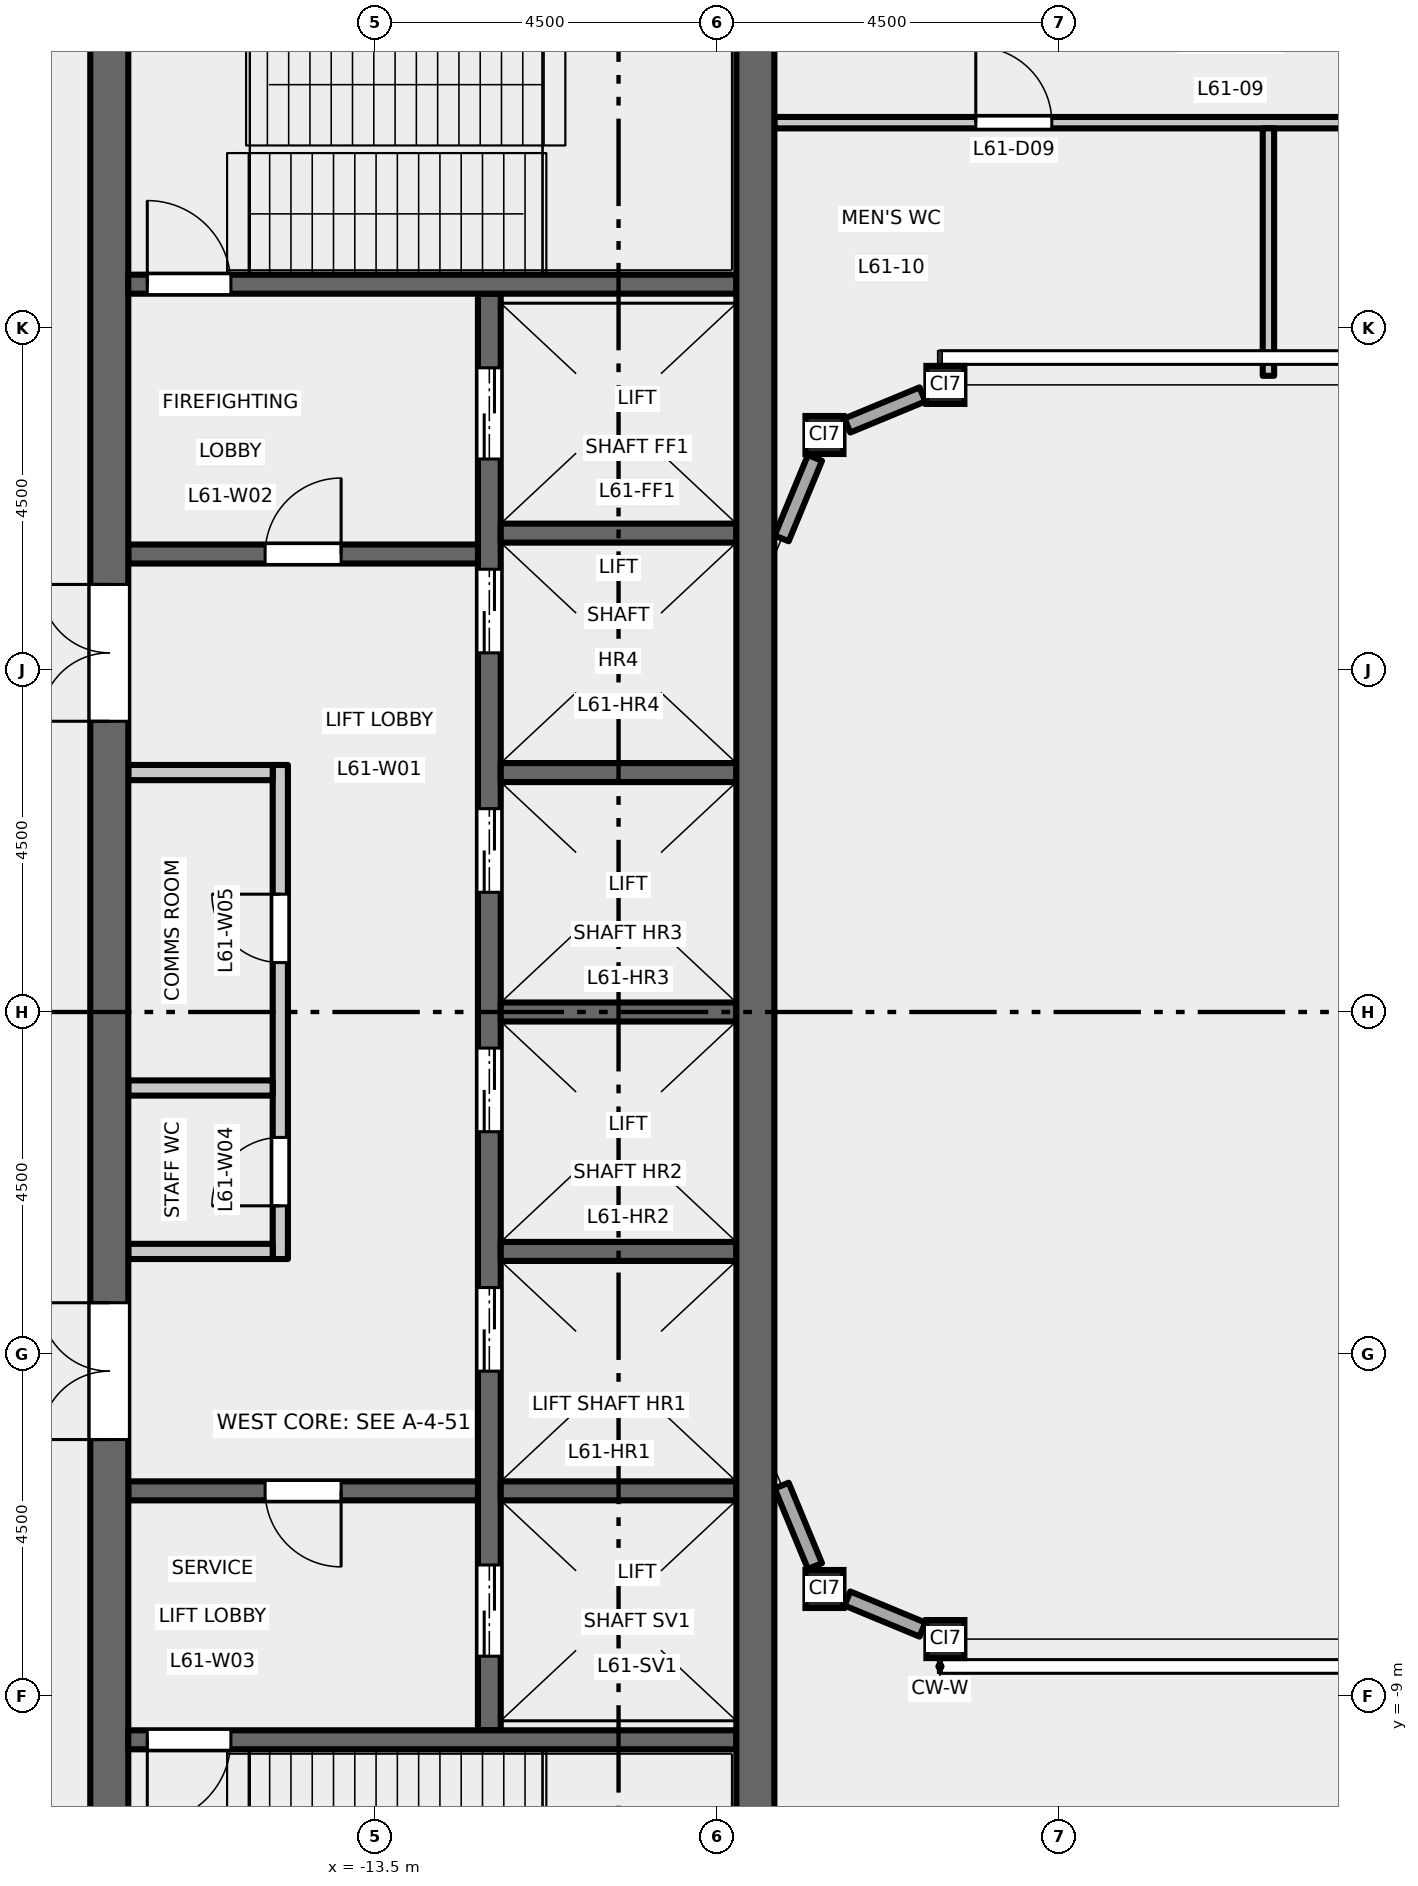
"""IFC4 building model, lengths in metres.
Left out: names, types, materials, properties, quantities, classifications, styles, units other than length and angle.
Written with IfcOpenShell. Run it as: python <this file> out.ifc"""

import sys

from ifc_helpers import new_model, si_unit, direction, frame, frame_2d, origin, origin_2d, place, context, subcontext, project, spatial, rectangle, hollow_rectangle, extrude, element, fill, save


model = new_model("IFC4")
c1 = context("Model", 3, precision=1e-05, world=origin(), true_north=direction((0.0, 1.0)))
c2 = subcontext(c1, "Body", "Model", "MODEL_VIEW")
j1 = project(units=[si_unit("LENGTHUNIT", "METRE"), si_unit("PLANEANGLEUNIT", "RADIAN")], contexts=[c1])
p1 = place(None, origin())
s1 = spatial("IfcSite", under=j1, at=p1, CompositionType="ELEMENT")
p2 = place(p1, origin())
s2 = spatial("IfcBuilding", under=s1, at=p2, CompositionType="ELEMENT")
p3 = place(p2, frame((0.0, 0.0, 284.2)))
s3 = spatial("IfcBuildingStorey", under=s2, at=p3, CompositionType="ELEMENT", Elevation=284.2)
for number, where, z_axis, x_axis in (
    (1, (-7.591, -7.591, 0.0), (0.0, 0.0, 1.0), (1.0, 0.0, 0.0)),
    (2, (-6.0, -8.25, 0.0), (0.0, 0.0, 1.0), (1.0, 0.0, 0.0)),
    (3, (-7.591, 7.591, 0.0), (0.0, 0.0, 1.0), (1.0, 0.0, 0.0)),
    (4, (-6.0, 8.25, 0.0), (0.0, 0.0, 1.0), (1.0, 0.0, 0.0)),
):
    element("IfcColumn", number, at=place(p3, frame(where, z_axis=z_axis, x_axis=x_axis)), inside=s3, PredefinedType="COLUMN", context=c2, shape_type="SweptSolid", body=[
        extrude(hollow_rectangle(XDim=0.5, YDim=0.5, WallThickness=0.025, at=origin_2d()), origin(), (0.0, 0.0, 1.0), 5.5),
    ])
p4 = place(p3, frame((-14.75, -3.25, 0.0), z_axis=(0.0, 0.0, 1.0), x_axis=(0.0, 1.0, 0.0)))
e5 = element("IfcWall", 5, at=p4, inside=s3, PredefinedType="PARTITIONING", context=c2, shape_type="SweptSolid", body=[
    extrude(rectangle(XDim=6.5, YDim=0.2, at=frame_2d((3.25, 0.0))), origin(), (0.0, 0.0, 1.0), 5.35),
])
p5 = place(p4, frame((0.7, 0.0, 0.0)))
e6 = element("IfcOpeningElement", 6, at=p5, cuts=e5, PredefinedType="OPENING", context=c2, shape_type="SweptSolid", body=[
    extrude(rectangle(XDim=0.9, YDim=2.1, at=frame_2d((0.45, 1.05))), frame((0.0, 0.11, 0.0), z_axis=(0.0, -1.0, 0.0), x_axis=(1.0, 0.0, 0.0)), (0.0, 0.0, 1.0), 0.22),
])
p6 = place(p4, frame((3.9, 0.0, 0.0)))
e7 = element("IfcOpeningElement", 7, at=p6, cuts=e5, PredefinedType="OPENING", context=c2, shape_type="SweptSolid", body=[
    extrude(rectangle(XDim=0.9, YDim=2.1, at=frame_2d((0.45, 1.05))), frame((0.0, 0.11, 0.0), z_axis=(0.0, -1.0, 0.0), x_axis=(1.0, 0.0, 0.0)), (0.0, 0.0, 1.0), 0.22),
])
for number, where, z_axis, x_axis in (
    (8, (-14.85, 3.15, 0.0), (0.0, 0.0, 1.0), (-1.0, 0.0, 0.0)),
    (9, (-14.85, -3.15, 0.0), (0.0, 0.0, 1.0), (-1.0, 0.0, 0.0)),
    (10, (-14.85, -1.0, 0.0), (0.0, 0.0, 1.0), (-1.0, 0.0, 0.0)),
):
    element("IfcWall", number, at=place(p3, frame(where, z_axis=z_axis, x_axis=x_axis)), inside=s3, PredefinedType="PARTITIONING", context=c2, shape_type="SweptSolid", body=[
        extrude(rectangle(XDim=1.9, YDim=0.2, at=frame_2d((0.95, 0.0))), origin(), (0.0, 0.0, 1.0), 5.35),
    ])
p7 = place(p3, frame((-12.0, -9.45, 0.0), z_axis=(0.0, 0.0, 1.0), x_axis=(0.0, 1.0, 0.0)))
e11 = element("IfcWall", 11, at=p7, inside=s3, PredefinedType="SHEAR", context=c2, shape_type="SweptSolid", body=[
    extrude(rectangle(XDim=18.9, YDim=0.3, at=frame_2d((9.45, 0.0))), origin(), (0.0, 0.0, 1.0), 5.35),
])
p8 = place(p7, frame((4.725, 0.0, 0.0)))
e12 = element("IfcOpeningElement", 12, at=p8, cuts=e11, PredefinedType="OPENING", context=c2, shape_type="SweptSolid", body=[
    extrude(rectangle(XDim=1.1, YDim=2.1, at=frame_2d((0.55, 1.05))), frame((0.0, 0.16, 0.0), z_axis=(0.0, -1.0, 0.0), x_axis=(1.0, 0.0, 0.0)), (0.0, 0.0, 1.0), 0.32),
])
p9 = place(p7, frame((7.875, 0.0, 0.0)))
e13 = element("IfcOpeningElement", 13, at=p9, cuts=e11, PredefinedType="OPENING", context=c2, shape_type="SweptSolid", body=[
    extrude(rectangle(XDim=1.1, YDim=2.1, at=frame_2d((0.55, 1.05))), frame((0.0, 0.16, 0.0), z_axis=(0.0, -1.0, 0.0), x_axis=(1.0, 0.0, 0.0)), (0.0, 0.0, 1.0), 0.32),
])
p10 = place(p7, frame((11.025, 0.0, 0.0)))
e14 = element("IfcOpeningElement", 14, at=p10, cuts=e11, PredefinedType="OPENING", context=c2, shape_type="SweptSolid", body=[
    extrude(rectangle(XDim=1.1, YDim=2.1, at=frame_2d((0.55, 1.05))), frame((0.0, 0.16, 0.0), z_axis=(0.0, -1.0, 0.0), x_axis=(1.0, 0.0, 0.0)), (0.0, 0.0, 1.0), 0.32),
])
p11 = place(p7, frame((14.175, 0.0, 0.0)))
e15 = element("IfcOpeningElement", 15, at=p11, cuts=e11, PredefinedType="OPENING", context=c2, shape_type="SweptSolid", body=[
    extrude(rectangle(XDim=1.1, YDim=2.1, at=frame_2d((0.55, 1.05))), frame((0.0, 0.16, 0.0), z_axis=(0.0, -1.0, 0.0), x_axis=(1.0, 0.0, 0.0)), (0.0, 0.0, 1.0), 0.32),
])
p12 = place(p7, frame((16.725, 0.0, 0.0)))
e16 = element("IfcOpeningElement", 16, at=p12, cuts=e11, PredefinedType="OPENING", context=c2, shape_type="SweptSolid", body=[
    extrude(rectangle(XDim=1.2, YDim=2.1, at=frame_2d((0.6, 1.05))), frame((0.0, 0.16, 0.0), z_axis=(0.0, -1.0, 0.0), x_axis=(1.0, 0.0, 0.0)), (0.0, 0.0, 1.0), 0.32),
])
p13 = place(p7, frame((0.975, 0.0, 0.0)))
e17 = element("IfcOpeningElement", 17, at=p13, cuts=e11, PredefinedType="OPENING", context=c2, shape_type="SweptSolid", body=[
    extrude(rectangle(XDim=1.2, YDim=2.1, at=frame_2d((0.6, 1.05))), frame((0.0, 0.16, 0.0), z_axis=(0.0, -1.0, 0.0), x_axis=(1.0, 0.0, 0.0)), (0.0, 0.0, 1.0), 0.32),
])
p14 = place(p3, frame((-12.15, 6.025, 0.0), z_axis=(0.0, 0.0, 1.0), x_axis=(-1.0, 0.0, 0.0)))
e18 = element("IfcWall", 18, at=p14, inside=s3, PredefinedType="SHEAR", context=c2, shape_type="SweptSolid", body=[
    extrude(rectangle(XDim=4.6, YDim=0.25, at=frame_2d((2.3, 0.0))), origin(), (0.0, 0.0, 1.0), 5.35),
])
p15 = place(p14, frame((1.8, 0.0, 0.0)))
e19 = element("IfcOpeningElement", 19, at=p15, cuts=e18, PredefinedType="OPENING", context=c2, shape_type="SweptSolid", body=[
    extrude(rectangle(XDim=1.0, YDim=2.1, at=frame_2d((0.5, 1.05))), frame((0.0, 0.135, 0.0), z_axis=(0.0, -1.0, 0.0), x_axis=(1.0, 0.0, 0.0)), (0.0, 0.0, 1.0), 0.27),
])
p16 = place(p3, frame((-12.15, -6.3, 0.0), z_axis=(0.0, 0.0, 1.0), x_axis=(-1.0, 0.0, 0.0)))
e20 = element("IfcWall", 20, at=p16, inside=s3, PredefinedType="SHEAR", context=c2, shape_type="SweptSolid", body=[
    extrude(rectangle(XDim=4.6, YDim=0.25, at=frame_2d((2.3, 0.0))), origin(), (0.0, 0.0, 1.0), 5.35),
])
p17 = place(p16, frame((1.8, 0.0, 0.0)))
e21 = element("IfcOpeningElement", 21, at=p17, cuts=e20, PredefinedType="OPENING", context=c2, shape_type="SweptSolid", body=[
    extrude(rectangle(XDim=1.0, YDim=2.1, at=frame_2d((0.5, 1.05))), frame((0.0, 0.135, 0.0), z_axis=(0.0, -1.0, 0.0), x_axis=(1.0, 0.0, 0.0)), (0.0, 0.0, 1.0), 0.27),
])
p18 = place(p3, frame((-17.0, -13.0, 0.0), z_axis=(0.0, 0.0, 1.0), x_axis=(0.0, 1.0, 0.0)))
e22 = element("IfcWall", 22, at=p18, inside=s3, PredefinedType="SHEAR", context=c2, shape_type="SweptSolid", body=[
    extrude(rectangle(XDim=26.0, YDim=0.5, at=frame_2d((13.0, 0.0))), origin(), (0.0, 0.0, 1.0), 5.35),
])
p19 = place(p18, frame((16.825, 0.0, 0.0)))
e23 = element("IfcOpeningElement", 23, at=p19, cuts=e22, PredefinedType="OPENING", context=c2, shape_type="SweptSolid", body=[
    extrude(rectangle(XDim=1.8, YDim=2.1, at=frame_2d((0.9, 1.05))), frame((0.0, 0.26, 0.0), z_axis=(0.0, -1.0, 0.0), x_axis=(1.0, 0.0, 0.0)), (0.0, 0.0, 1.0), 0.52),
])
p20 = place(p18, frame((7.375, 0.0, 0.0)))
e24 = element("IfcOpeningElement", 24, at=p20, cuts=e22, PredefinedType="OPENING", context=c2, shape_type="SweptSolid", body=[
    extrude(rectangle(XDim=1.8, YDim=2.1, at=frame_2d((0.9, 1.05))), frame((0.0, 0.26, 0.0), z_axis=(0.0, -1.0, 0.0), x_axis=(1.0, 0.0, 0.0)), (0.0, 0.0, 1.0), 0.52),
])
for number, where, z_axis, x_axis in (
    (25, (-8.75, 0.0, 0.0), (0.0, 0.0, 1.0), (-1.0, 0.0, 0.0)),
    (26, (-8.75, 3.15, 0.0), (0.0, 0.0, 1.0), (-1.0, 0.0, 0.0)),
    (27, (-8.75, 6.3, 0.0), (0.0, 0.0, 1.0), (-1.0, 0.0, 0.0)),
    (28, (-8.75, -3.15, 0.0), (0.0, 0.0, 1.0), (-1.0, 0.0, 0.0)),
    (29, (-8.75, -6.3, 0.0), (0.0, 0.0, 1.0), (-1.0, 0.0, 0.0)),
):
    element("IfcWall", number, at=place(p3, frame(where, z_axis=z_axis, x_axis=x_axis)), inside=s3, PredefinedType="SHEAR", context=c2, shape_type="SweptSolid", body=[
        extrude(rectangle(XDim=3.1, YDim=0.25, at=frame_2d((1.55, 0.0))), origin(), (0.0, 0.0, 1.0), 5.35),
    ])
p21 = place(p3, frame((-8.75, 9.575, 0.0), z_axis=(0.0, 0.0, 1.0), x_axis=(-1.0, 0.0, 0.0)))
e30 = element("IfcWall", 30, at=p21, inside=s3, PredefinedType="SHEAR", context=c2, shape_type="SweptSolid", body=[
    extrude(rectangle(XDim=8.0, YDim=0.25, at=frame_2d((4.0, 0.0))), origin(), (0.0, 0.0, 1.0), 5.35),
])
p22 = place(p21, frame((6.65, 0.0, 0.0)))
e31 = element("IfcOpeningElement", 31, at=p22, cuts=e30, PredefinedType="OPENING", context=c2, shape_type="SweptSolid", body=[
    extrude(rectangle(XDim=1.1, YDim=2.1, at=frame_2d((0.55, 1.05))), frame((0.0, 0.135, 0.0), z_axis=(0.0, -1.0, 0.0), x_axis=(1.0, 0.0, 0.0)), (0.0, 0.0, 1.0), 0.27),
])
p23 = place(p3, frame((-8.75, -9.575, 0.0), z_axis=(0.0, 0.0, 1.0), x_axis=(-1.0, 0.0, 0.0)))
e32 = element("IfcWall", 32, at=p23, inside=s3, PredefinedType="SHEAR", context=c2, shape_type="SweptSolid", body=[
    extrude(rectangle(XDim=8.0, YDim=0.25, at=frame_2d((4.0, 0.0))), origin(), (0.0, 0.0, 1.0), 5.35),
])
p24 = place(p23, frame((6.65, 0.0, 0.0)))
e33 = element("IfcOpeningElement", 33, at=p24, cuts=e32, PredefinedType="OPENING", context=c2, shape_type="SweptSolid", body=[
    extrude(rectangle(XDim=1.1, YDim=2.1, at=frame_2d((0.55, 1.05))), frame((0.0, 0.135, 0.0), z_axis=(0.0, -1.0, 0.0), x_axis=(1.0, 0.0, 0.0)), (0.0, 0.0, 1.0), 0.27),
])
p25 = place(p3, frame((-8.5, -13.0, 0.0), z_axis=(0.0, 0.0, 1.0), x_axis=(0.0, 1.0, 0.0)))
e34 = element("IfcWall", 34, at=p25, inside=s3, PredefinedType="SHEAR", context=c2, shape_type="SweptSolid", body=[
    extrude(rectangle(XDim=26.0, YDim=0.5, at=frame_2d((13.0, 0.0))), origin(), (0.0, 0.0, 1.0), 5.35),
])
p26 = place(p3, frame((-6.302, 8.125, 0.0), z_axis=(0.0, 0.0, 1.0), x_axis=(-0.923919409248, -0.382587147216, 0.0)))
e35 = element("IfcWall", 35, at=p26, inside=s3, PredefinedType="STANDARD", context=c2, shape_type="SweptSolid", body=[
    extrude(rectangle(XDim=1.069, YDim=0.2, at=frame_2d((0.534, 0.0))), origin(), (0.0, 0.0, 1.0), 5.01),
])
for number, where, z_axis, x_axis in (
    (36, (-7.716, 7.289, 0.0), (0.0, 0.0, 1.0), (-0.383, -0.924, 0.0)),
    (37, (-8.154, -6.231, 0.0), (0.0, 0.0, 1.0), (0.383, -0.924, 0.0)),
):
    element("IfcWall", number, at=place(p3, frame(where, z_axis=z_axis, x_axis=x_axis)), inside=s3, PredefinedType="STANDARD", context=c2, shape_type="SweptSolid", body=[
        extrude(rectangle(XDim=1.146, YDim=0.2, at=frame_2d((0.573, 0.0))), origin(), (0.0, 0.0, 1.0), 5.01),
    ])
p27 = place(p3, frame((-7.289, -7.716, 0.0), z_axis=(0.0, 0.0, 1.0), x_axis=(0.923919409248, -0.382587147216, 0.0)))
e38 = element("IfcWall", 38, at=p27, inside=s3, PredefinedType="STANDARD", context=c2, shape_type="SweptSolid", body=[
    extrude(rectangle(XDim=1.069, YDim=0.2, at=frame_2d((0.534, 0.0))), origin(), (0.0, 0.0, 1.0), 5.01),
])
p28 = place(p3, frame((-8.25, 11.7, 0.0), z_axis=(0.0, 0.0, 1.0), x_axis=(1.0, 0.0, 0.0)))
e39 = element("IfcWall", 39, at=p28, inside=s3, PredefinedType="PARTITIONING", context=c2, shape_type="SweptSolid", body=[
    extrude(rectangle(XDim=15.25, YDim=0.15, at=frame_2d((7.625, 0.0))), origin(), (0.0, 0.0, 1.0), 5.35),
])
p29 = place(p28, frame((2.65, 0.0, 0.0)))
e40 = element("IfcOpeningElement", 40, at=p29, cuts=e39, PredefinedType="OPENING", context=c2, shape_type="SweptSolid", body=[
    extrude(rectangle(XDim=1.0, YDim=2.1, at=frame_2d((0.5, 1.05))), frame((0.0, 0.085, 0.0), z_axis=(0.0, -1.0, 0.0), x_axis=(1.0, 0.0, 0.0)), (0.0, 0.0, 1.0), 0.17),
])
p30 = place(p28, frame((9.15, 0.0, 0.0)))
e41 = element("IfcOpeningElement", 41, at=p30, cuts=e39, PredefinedType="OPENING", context=c2, shape_type="SweptSolid", body=[
    extrude(rectangle(XDim=1.0, YDim=2.1, at=frame_2d((0.5, 1.05))), frame((0.0, 0.085, 0.0), z_axis=(0.0, -1.0, 0.0), x_axis=(1.0, 0.0, 0.0)), (0.0, 0.0, 1.0), 0.17),
])
p31 = place(p28, frame((13.65, 0.0, 0.0)))
e42 = element("IfcOpeningElement", 42, at=p31, cuts=e39, PredefinedType="OPENING", context=c2, shape_type="SweptSolid", body=[
    extrude(rectangle(XDim=1.0, YDim=2.1, at=frame_2d((0.5, 1.05))), frame((0.0, 0.085, 0.0), z_axis=(0.0, -1.0, 0.0), x_axis=(1.0, 0.0, 0.0)), (0.0, 0.0, 1.0), 0.17),
])
p32 = place(p3, frame((-1.75, 8.37, 0.0), z_axis=(0.0, 0.0, 1.0), x_axis=(0.0, 1.0, 0.0)))
e43 = element("IfcWall", 43, at=p32, inside=s3, PredefinedType="PARTITIONING", context=c2, shape_type="SweptSolid", body=[
    extrude(rectangle(XDim=3.255, YDim=0.15, at=frame_2d((1.627, 0.0))), origin(), (0.0, 0.0, 1.0), 5.35),
])
p33 = place(p15, origin())
e44 = element("IfcDoor", 44, at=p33, inside=s3, OperationType="SINGLE_SWING_LEFT", PredefinedType="DOOR", context=c2, shape_type="SweptSolid", body=[
    extrude(rectangle(XDim=1.0, YDim=2.1, at=frame_2d((0.5, 1.05))), frame((0.0, 0.025, 0.0), z_axis=(0.0, -1.0, 0.0), x_axis=(1.0, 0.0, 0.0)), (0.0, 0.0, 1.0), 0.05),
])
fill(e19, e44)
p34 = place(p17, origin())
e45 = element("IfcDoor", 45, at=p34, inside=s3, OperationType="SINGLE_SWING_RIGHT", PredefinedType="DOOR", context=c2, shape_type="SweptSolid", body=[
    extrude(rectangle(XDim=1.0, YDim=2.1, at=frame_2d((0.5, 1.05))), frame((0.0, 0.025, 0.0), z_axis=(0.0, -1.0, 0.0), x_axis=(1.0, 0.0, 0.0)), (0.0, 0.0, 1.0), 0.05),
])
fill(e21, e45)
p35 = place(p22, origin())
e46 = element("IfcDoor", 46, at=p35, inside=s3, OperationType="SINGLE_SWING_RIGHT", PredefinedType="DOOR", context=c2, shape_type="SweptSolid", body=[
    extrude(rectangle(XDim=1.1, YDim=2.1, at=frame_2d((0.55, 1.05))), frame((0.0, 0.025, 0.0), z_axis=(0.0, -1.0, 0.0), x_axis=(1.0, 0.0, 0.0)), (0.0, 0.0, 1.0), 0.05),
])
fill(e31, e46)
p36 = place(p24, origin())
e47 = element("IfcDoor", 47, at=p36, inside=s3, OperationType="SINGLE_SWING_LEFT", PredefinedType="DOOR", context=c2, shape_type="SweptSolid", body=[
    extrude(rectangle(XDim=1.1, YDim=2.1, at=frame_2d((0.55, 1.05))), frame((0.0, 0.025, 0.0), z_axis=(0.0, -1.0, 0.0), x_axis=(1.0, 0.0, 0.0)), (0.0, 0.0, 1.0), 0.05),
])
fill(e33, e47)
p37 = place(p19, origin())
e48 = element("IfcDoor", 48, at=p37, inside=s3, OperationType="DOUBLE_DOOR_DOUBLE_SWING", PredefinedType="DOOR", context=c2, shape_type="SweptSolid", body=[
    extrude(rectangle(XDim=1.8, YDim=2.1, at=frame_2d((0.9, 1.05))), frame((0.0, 0.025, 0.0), z_axis=(0.0, -1.0, 0.0), x_axis=(1.0, 0.0, 0.0)), (0.0, 0.0, 1.0), 0.05),
])
fill(e23, e48)
p38 = place(p20, origin())
e49 = element("IfcDoor", 49, at=p38, inside=s3, OperationType="DOUBLE_DOOR_DOUBLE_SWING", PredefinedType="DOOR", context=c2, shape_type="SweptSolid", body=[
    extrude(rectangle(XDim=1.8, YDim=2.1, at=frame_2d((0.9, 1.05))), frame((0.0, 0.025, 0.0), z_axis=(0.0, -1.0, 0.0), x_axis=(1.0, 0.0, 0.0)), (0.0, 0.0, 1.0), 0.05),
])
fill(e24, e49)
p39 = place(p8, origin())
e50 = element("IfcDoor", 50, at=p39, inside=s3, OperationType="DOUBLE_DOOR_SLIDING", PredefinedType="DOOR", context=c2, shape_type="SweptSolid", body=[
    extrude(rectangle(XDim=1.1, YDim=2.1, at=frame_2d((0.55, 1.05))), frame((0.0, 0.025, 0.0), z_axis=(0.0, -1.0, 0.0), x_axis=(1.0, 0.0, 0.0)), (0.0, 0.0, 1.0), 0.05),
])
fill(e12, e50)
p40 = place(p9, origin())
e51 = element("IfcDoor", 51, at=p40, inside=s3, OperationType="DOUBLE_DOOR_SLIDING", PredefinedType="DOOR", context=c2, shape_type="SweptSolid", body=[
    extrude(rectangle(XDim=1.1, YDim=2.1, at=frame_2d((0.55, 1.05))), frame((0.0, 0.025, 0.0), z_axis=(0.0, -1.0, 0.0), x_axis=(1.0, 0.0, 0.0)), (0.0, 0.0, 1.0), 0.05),
])
fill(e13, e51)
p41 = place(p10, origin())
e52 = element("IfcDoor", 52, at=p41, inside=s3, OperationType="DOUBLE_DOOR_SLIDING", PredefinedType="DOOR", context=c2, shape_type="SweptSolid", body=[
    extrude(rectangle(XDim=1.1, YDim=2.1, at=frame_2d((0.55, 1.05))), frame((0.0, 0.025, 0.0), z_axis=(0.0, -1.0, 0.0), x_axis=(1.0, 0.0, 0.0)), (0.0, 0.0, 1.0), 0.05),
])
fill(e14, e52)
p42 = place(p11, origin())
e53 = element("IfcDoor", 53, at=p42, inside=s3, OperationType="DOUBLE_DOOR_SLIDING", PredefinedType="DOOR", context=c2, shape_type="SweptSolid", body=[
    extrude(rectangle(XDim=1.1, YDim=2.1, at=frame_2d((0.55, 1.05))), frame((0.0, 0.025, 0.0), z_axis=(0.0, -1.0, 0.0), x_axis=(1.0, 0.0, 0.0)), (0.0, 0.0, 1.0), 0.05),
])
fill(e15, e53)
p43 = place(p12, origin())
e54 = element("IfcDoor", 54, at=p43, inside=s3, OperationType="DOUBLE_DOOR_SLIDING", PredefinedType="DOOR", context=c2, shape_type="SweptSolid", body=[
    extrude(rectangle(XDim=1.2, YDim=2.1, at=frame_2d((0.6, 1.05))), frame((0.0, 0.025, 0.0), z_axis=(0.0, -1.0, 0.0), x_axis=(1.0, 0.0, 0.0)), (0.0, 0.0, 1.0), 0.05),
])
fill(e16, e54)
p44 = place(p13, origin())
e55 = element("IfcDoor", 55, at=p44, inside=s3, OperationType="DOUBLE_DOOR_SLIDING", PredefinedType="DOOR", context=c2, shape_type="SweptSolid", body=[
    extrude(rectangle(XDim=1.2, YDim=2.1, at=frame_2d((0.6, 1.05))), frame((0.0, 0.025, 0.0), z_axis=(0.0, -1.0, 0.0), x_axis=(1.0, 0.0, 0.0)), (0.0, 0.0, 1.0), 0.05),
])
fill(e17, e55)
p45 = place(p5, origin())
e56 = element("IfcDoor", 56, at=p45, inside=s3, OperationType="SINGLE_SWING_RIGHT", PredefinedType="DOOR", context=c2, shape_type="SweptSolid", body=[
    extrude(rectangle(XDim=0.9, YDim=2.1, at=frame_2d((0.45, 1.05))), frame((0.0, 0.025, 0.0), z_axis=(0.0, -1.0, 0.0), x_axis=(1.0, 0.0, 0.0)), (0.0, 0.0, 1.0), 0.05),
])
fill(e6, e56)
p46 = place(p6, origin())
e57 = element("IfcDoor", 57, at=p46, inside=s3, OperationType="SINGLE_SWING_LEFT", PredefinedType="DOOR", context=c2, shape_type="SweptSolid", body=[
    extrude(rectangle(XDim=0.9, YDim=2.1, at=frame_2d((0.45, 1.05))), frame((0.0, 0.025, 0.0), z_axis=(0.0, -1.0, 0.0), x_axis=(1.0, 0.0, 0.0)), (0.0, 0.0, 1.0), 0.05),
])
fill(e7, e57)
p47 = place(p29, origin())
e58 = element("IfcDoor", 58, at=p47, inside=s3, OperationType="SINGLE_SWING_LEFT", PredefinedType="DOOR", context=c2, shape_type="SweptSolid", body=[
    extrude(rectangle(XDim=1.0, YDim=2.1, at=frame_2d((0.5, 1.05))), frame((0.0, 0.025, 0.0), z_axis=(0.0, -1.0, 0.0), x_axis=(1.0, 0.0, 0.0)), (0.0, 0.0, 1.0), 0.05),
])
fill(e40, e58)
save(model, sys.argv[1])
